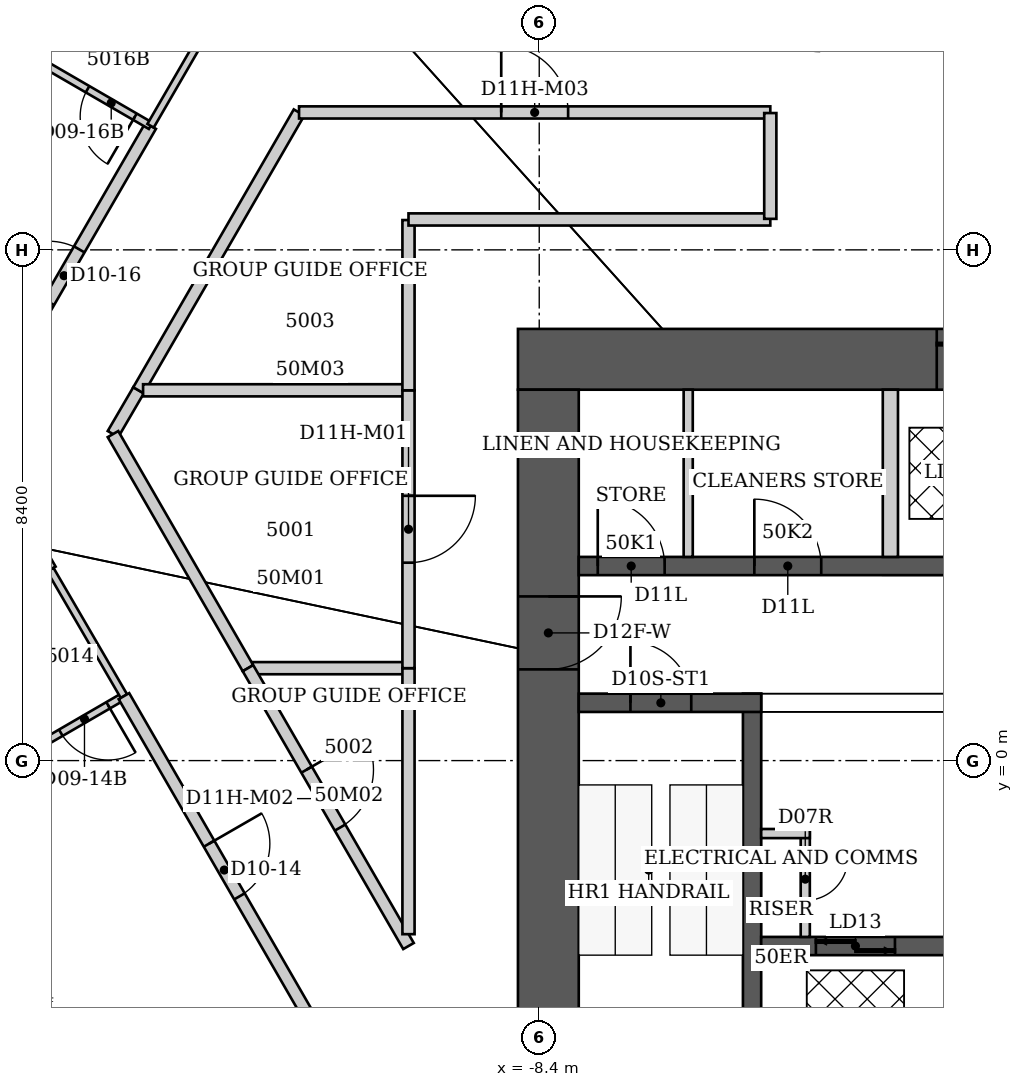
"""IFC4 building model, lengths in metres.
Left out: names, types, materials, properties, quantities, classifications, styles, units other than length and angle.
Written with IfcOpenShell. Run it as: python <this file> out.ifc"""

import sys

from ifc_helpers import new_model, si_unit, direction, frame, frame_2d, origin, place, context, subcontext, project, spatial, rectangle, extrude, element, fill, save


model = new_model("IFC4")
c1 = context("Model", 3, precision=1e-05, world=origin(), true_north=direction((0.0, 1.0)))
c2 = subcontext(c1, "Body", "Model", "MODEL_VIEW")
j1 = project(units=[si_unit("LENGTHUNIT", "METRE"), si_unit("PLANEANGLEUNIT", "RADIAN")], contexts=[c1])
p1 = place(None, origin())
s1 = spatial("IfcSite", under=j1, at=p1, CompositionType="ELEMENT")
p2 = place(p1, origin())
s2 = spatial("IfcBuilding", under=s1, at=p2, CompositionType="ELEMENT")
p3 = place(p2, frame((0.0, 0.0, 202.2)))
s3 = spatial("IfcBuildingStorey", under=s2, at=p3, CompositionType="ELEMENT", Elevation=202.2)
p4 = place(p3, frame((-8.75, 6.6, 0.0), z_axis=(0.0, 0.0, 1.0), x_axis=(1.0, 0.0, 0.0)))
e1 = element("IfcWall", 1, at=p4, inside=s3, PredefinedType="SHEAR", context=c2, shape_type="SweptSolid", body=[
    extrude(rectangle(XDim=17.5, YDim=1.0, at=frame_2d((8.75, 0.0))), origin(), (0.0, 0.0, 1.0), 3.8),
])
p5 = place(p4, frame((6.887, 0.0, 0.0)))
e2 = element("IfcOpeningElement", 2, at=p5, cuts=e1, PredefinedType="OPENING", context=c2, shape_type="SweptSolid", body=[
    extrude(rectangle(XDim=1.1, YDim=2.1, at=frame_2d((0.55, 1.05))), frame((0.0, 0.5, 0.0), z_axis=(0.0, -1.0, 0.0), x_axis=(1.0, 0.0, 0.0)), (0.0, 0.0, 1.0), 1.0),
])
p6 = place(p4, frame((9.512, 0.0, 0.0)))
e3 = element("IfcOpeningElement", 3, at=p6, cuts=e1, PredefinedType="OPENING", context=c2, shape_type="SweptSolid", body=[
    extrude(rectangle(XDim=1.1, YDim=2.1, at=frame_2d((0.55, 1.05))), frame((0.0, 0.5, 0.0), z_axis=(0.0, -1.0, 0.0), x_axis=(1.0, 0.0, 0.0)), (0.0, 0.0, 1.0), 1.0),
])
p7 = place(p4, frame((12.137, 0.0, 0.0)))
e4 = element("IfcOpeningElement", 4, at=p7, cuts=e1, PredefinedType="OPENING", context=c2, shape_type="SweptSolid", body=[
    extrude(rectangle(XDim=1.1, YDim=2.1, at=frame_2d((0.55, 1.05))), frame((0.0, 0.5, 0.0), z_axis=(0.0, -1.0, 0.0), x_axis=(1.0, 0.0, 0.0)), (0.0, 0.0, 1.0), 1.0),
])
p8 = place(p4, frame((14.762, 0.0, 0.0)))
e5 = element("IfcOpeningElement", 5, at=p8, cuts=e1, PredefinedType="OPENING", context=c2, shape_type="SweptSolid", body=[
    extrude(rectangle(XDim=1.1, YDim=2.1, at=frame_2d((0.55, 1.05))), frame((0.0, 0.5, 0.0), z_axis=(0.0, -1.0, 0.0), x_axis=(1.0, 0.0, 0.0)), (0.0, 0.0, 1.0), 1.0),
])
p9 = place(p3, frame((-8.25, -6.1, 0.0), z_axis=(0.0, 0.0, 1.0), x_axis=(0.0, 1.0, 0.0)))
e6 = element("IfcWall", 6, at=p9, inside=s3, PredefinedType="SHEAR", context=c2, shape_type="SweptSolid", body=[
    extrude(rectangle(XDim=12.2, YDim=1.0, at=frame_2d((6.1, 0.0))), origin(), (0.0, 0.0, 1.0), 3.8),
])
p10 = place(p9, frame((7.6, 0.0, 0.0)))
e7 = element("IfcOpeningElement", 7, at=p10, cuts=e6, PredefinedType="OPENING", context=c2, shape_type="SweptSolid", body=[
    extrude(rectangle(XDim=1.2, YDim=2.2, at=frame_2d((0.6, 1.1))), frame((0.0, 0.5, 0.0), z_axis=(0.0, -1.0, 0.0), x_axis=(1.0, 0.0, 0.0)), (0.0, 0.0, 1.0), 1.0),
])
p11 = place(p3, frame((-4.9, -6.1, 0.0), z_axis=(0.0, 0.0, 1.0), x_axis=(0.0, 1.0, 0.0)))
e8 = element("IfcWall", 8, at=p11, inside=s3, PredefinedType="SHEAR", context=c2, shape_type="SweptSolid", body=[
    extrude(rectangle(XDim=7.2, YDim=0.3, at=frame_2d((3.6, 0.0))), origin(), (0.0, 0.0, 1.0), 3.8),
])
p12 = place(p3, frame((-7.75, 0.95, 0.0), z_axis=(0.0, 0.0, 1.0), x_axis=(1.0, 0.0, 0.0)))
e9 = element("IfcWall", 9, at=p12, inside=s3, PredefinedType="SHEAR", context=c2, shape_type="SweptSolid", body=[
    extrude(rectangle(XDim=3.0, YDim=0.3, at=frame_2d((1.5, 0.0))), origin(), (0.0, 0.0, 1.0), 3.8),
])
p13 = place(p12, frame((0.85, 0.0, 0.0)))
e10 = element("IfcOpeningElement", 10, at=p13, cuts=e9, PredefinedType="OPENING", context=c2, shape_type="SweptSolid", body=[
    extrude(rectangle(XDim=1.0, YDim=2.2, at=frame_2d((0.5, 1.1))), frame((0.0, 0.15, 0.0), z_axis=(0.0, -1.0, 0.0), x_axis=(1.0, 0.0, 0.0)), (0.0, 0.0, 1.0), 0.3),
])
p14 = place(p3, frame((-4.75, -3.05, 0.0), z_axis=(0.0, 0.0, 1.0), x_axis=(1.0, 0.0, 0.0)))
e11 = element("IfcWall", 11, at=p14, inside=s3, PredefinedType="SHEAR", context=c2, shape_type="SweptSolid", body=[
    extrude(rectangle(XDim=3.1, YDim=0.3, at=frame_2d((1.55, 0.0))), origin(), (0.0, 0.0, 1.0), 3.8),
])
p15 = place(p14, frame((0.9, 0.0, 0.0)))
e12 = element("IfcOpeningElement", 12, at=p15, cuts=e11, PredefinedType="OPENING", context=c2, shape_type="SweptSolid", body=[
    extrude(rectangle(XDim=1.3, YDim=2.1, at=frame_2d((0.65, 1.05))), frame((0.0, 0.15, 0.0), z_axis=(0.0, -1.0, 0.0), x_axis=(1.0, 0.0, 0.0)), (0.0, 0.0, 1.0), 0.3),
])
p16 = place(p3, frame((-7.75, 3.2, 0.0), z_axis=(0.0, 0.0, 1.0), x_axis=(1.0, 0.0, 0.0)))
e13 = element("IfcWall", 13, at=p16, inside=s3, PredefinedType="SHEAR", context=c2, shape_type="SweptSolid", body=[
    extrude(rectangle(XDim=15.5, YDim=0.3, at=frame_2d((7.75, 0.0))), origin(), (0.0, 0.0, 1.0), 3.8),
])
p17 = place(p16, frame((0.312, 0.0, 0.0)))
e14 = element("IfcOpeningElement", 14, at=p17, cuts=e13, PredefinedType="OPENING", context=c2, shape_type="SweptSolid", body=[
    extrude(rectangle(XDim=1.1, YDim=2.2, at=frame_2d((0.55, 1.1))), frame((0.0, 0.15, 0.0), z_axis=(0.0, -1.0, 0.0), x_axis=(1.0, 0.0, 0.0)), (0.0, 0.0, 1.0), 0.3),
])
p18 = place(p16, frame((2.887, 0.0, 0.0)))
e15 = element("IfcOpeningElement", 15, at=p18, cuts=e13, PredefinedType="OPENING", context=c2, shape_type="SweptSolid", body=[
    extrude(rectangle(XDim=1.1, YDim=2.2, at=frame_2d((0.55, 1.1))), frame((0.0, 0.15, 0.0), z_axis=(0.0, -1.0, 0.0), x_axis=(1.0, 0.0, 0.0)), (0.0, 0.0, 1.0), 0.3),
])
p19 = place(p3, frame((-2.625, 3.35, 0.0), z_axis=(0.0, 0.0, 1.0), x_axis=(0.0, 1.0, 0.0)))
e16 = element("IfcWall", 16, at=p19, inside=s3, PredefinedType="PARTITIONING", context=c2, shape_type="SweptSolid", body=[
    extrude(rectangle(XDim=2.75, YDim=0.25, at=frame_2d((1.375, 0.0))), origin(), (0.0, 0.0, 1.0), 3.8),
])
p20 = place(p3, frame((-17.64, 5.51, 0.0), z_axis=(0.0, 0.0, 1.0), x_axis=(0.500468304441, 0.865754859212, 0.0)))
e17 = element("IfcWall", 17, at=p20, inside=s3, PredefinedType="PARTITIONING", context=c2, shape_type="SweptSolid", body=[
    extrude(rectangle(XDim=5.694, YDim=0.2, at=frame_2d((2.847, 0.0))), origin(), (0.0, 0.0, 1.0), 3.64),
])
p21 = place(p20, frame((2.347, 0.0, 0.0)))
e18 = element("IfcOpeningElement", 18, at=p21, cuts=e17, PredefinedType="OPENING", context=c2, shape_type="SweptSolid", body=[
    extrude(rectangle(XDim=1.0, YDim=2.13, at=frame_2d((0.5, 1.065))), frame((0.0, 0.1, 0.0), z_axis=(0.0, -1.0, 0.0), x_axis=(1.0, 0.0, 0.0)), (0.0, 0.0, 1.0), 0.2),
])
p22 = place(p3, frame((-17.54, -0.28, 0.0), z_axis=(0.0, 0.0, 1.0), x_axis=(0.86498992408, 0.501789229896, 0.0)))
e19 = element("IfcWall", 19, at=p22, inside=s3, PredefinedType="PARTITIONING", context=c2, shape_type="SweptSolid", body=[
    extrude(rectangle(XDim=2.671, YDim=0.12, at=frame_2d((1.335, 0.0))), origin(), (0.0, 0.0, 1.0), 3.64),
])
p23 = place(p22, frame((1.47, 0.0, 0.0)))
e20 = element("IfcOpeningElement", 20, at=p23, cuts=e19, PredefinedType="OPENING", context=c2, shape_type="SweptSolid", body=[
    extrude(rectangle(XDim=0.9, YDim=2.03, at=frame_2d((0.45, 1.015))), frame((0.0, 0.06, 0.0), z_axis=(0.0, -1.0, 0.0), x_axis=(1.0, 0.0, 0.0)), (0.0, 0.0, 1.0), 0.12),
])
p24 = place(p3, frame((-17.05, 11.75, 0.0), z_axis=(0.0, 0.0, 1.0), x_axis=(0.865155281359, -0.50150407689, 0.0)))
e21 = element("IfcWall", 21, at=p24, inside=s3, PredefinedType="PARTITIONING", context=c2, shape_type="SweptSolid", body=[
    extrude(rectangle(XDim=2.612, YDim=0.12, at=frame_2d((1.306, 0.0))), origin(), (0.0, 0.0, 1.0), 3.64),
])
p25 = place(p24, frame((1.412, 0.0, 0.0)))
e22 = element("IfcOpeningElement", 22, at=p25, cuts=e21, PredefinedType="OPENING", context=c2, shape_type="SweptSolid", body=[
    extrude(rectangle(XDim=0.9, YDim=2.03, at=frame_2d((0.45, 1.015))), frame((0.0, 0.06, 0.0), z_axis=(0.0, -1.0, 0.0), x_axis=(1.0, 0.0, 0.0)), (0.0, 0.0, 1.0), 0.12),
])
p26 = place(p3, frame((-16.44, 3.14, 0.0), z_axis=(0.0, 0.0, 1.0), x_axis=(-0.497825198029, 0.867277390578, 0.0)))
e23 = element("IfcWall", 23, at=p26, inside=s3, PredefinedType="PARTITIONING", context=c2, shape_type="SweptSolid", body=[
    extrude(rectangle(XDim=2.571, YDim=0.2, at=frame_2d((1.286, 0.0))), origin(), (0.0, 0.0, 1.0), 3.64),
])
p27 = place(p26, frame((1.1, 0.0, 0.0)))
e24 = element("IfcOpeningElement", 24, at=p27, cuts=e23, PredefinedType="OPENING", context=c2, shape_type="SweptSolid", body=[
    extrude(rectangle(XDim=1.0, YDim=2.13, at=frame_2d((0.5, 1.065))), frame((0.0, 0.1, 0.0), z_axis=(0.0, -1.0, 0.0), x_axis=(1.0, 0.0, 0.0)), (0.0, 0.0, 1.0), 0.2),
])
p28 = place(p3, frame((-16.44, 3.14, 0.0), z_axis=(0.0, 0.0, 1.0), x_axis=(0.502854986947, -0.864370789709, 0.0)))
e25 = element("IfcWall", 25, at=p28, inside=s3, PredefinedType="PARTITIONING", context=c2, shape_type="SweptSolid", body=[
    extrude(rectangle(XDim=2.406, YDim=0.12, at=frame_2d((1.203, 0.0))), origin(), (0.0, 0.0, 1.0), 3.64),
])
p29 = place(p3, frame((-15.41, 5.37, 0.0), z_axis=(0.0, 0.0, 1.0), x_axis=(0.503943891868, 0.863736391412, 0.0)))
e26 = element("IfcWall", 26, at=p29, inside=s3, PredefinedType="PARTITIONING", context=c2, shape_type="SweptSolid", body=[
    extrude(rectangle(XDim=0.833, YDim=0.2, at=frame_2d((0.417, 0.0))), origin(), (0.0, 0.0, 1.0), 3.64),
])
p30 = place(p3, frame((-15.23, 1.06, 0.0), z_axis=(0.0, 0.0, 1.0), x_axis=(0.499729921425, -0.866181277581, 0.0)))
e27 = element("IfcWall", 27, at=p30, inside=s3, PredefinedType="PARTITIONING", context=c2, shape_type="SweptSolid", body=[
    extrude(rectangle(XDim=6.604, YDim=0.2, at=frame_2d((3.302, 0.0))), origin(), (0.0, 0.0, 1.0), 3.64),
])
p31 = place(p30, frame((2.802, 0.0, 0.0)))
e28 = element("IfcOpeningElement", 28, at=p31, cuts=e27, PredefinedType="OPENING", context=c2, shape_type="SweptSolid", body=[
    extrude(rectangle(XDim=1.0, YDim=2.13, at=frame_2d((0.5, 1.065))), frame((0.0, 0.1, 0.0), z_axis=(0.0, -1.0, 0.0), x_axis=(1.0, 0.0, 0.0)), (0.0, 0.0, 1.0), 0.2),
])
p32 = place(p3, frame((-14.99, 6.09, 0.0), z_axis=(0.0, 0.0, 1.0), x_axis=(0.500213626659, 0.86590203124, 0.0)))
e29 = element("IfcWall", 29, at=p32, inside=s3, PredefinedType="PARTITIONING", context=c2, shape_type="SweptSolid", body=[
    extrude(rectangle(XDim=5.278, YDim=0.2, at=frame_2d((2.639, 0.0))), origin(), (0.0, 0.0, 1.0), 3.64),
])
p33 = place(p3, frame((-14.915, 6.09, 0.0), z_axis=(0.0, 0.0, 1.0), x_axis=(1.0, 0.0, 0.0)))
e30 = element("IfcWall", 30, at=p33, inside=s3, PredefinedType="PARTITIONING", context=c2, shape_type="SweptSolid", body=[
    extrude(rectangle(XDim=4.355, YDim=0.2, at=frame_2d((2.177, 0.0))), origin(), (0.0, 0.0, 1.0), 3.64),
])
p34 = place(p3, frame((-14.792, 10.441, 0.0), z_axis=(0.0, 0.0, 1.0), x_axis=(0.501340276177, 0.865250210912, 0.0)))
e31 = element("IfcWall", 31, at=p34, inside=s3, PredefinedType="PARTITIONING", context=c2, shape_type="SweptSolid", body=[
    extrude(rectangle(XDim=2.437, YDim=0.12, at=frame_2d((1.219, 0.0))), origin(), (0.0, 0.0, 1.0), 3.64),
])
p35 = place(p3, frame((-13.19, 1.52, 0.0), z_axis=(0.0, 0.0, 1.0), x_axis=(-0.499513190454, 0.866306281036, 0.0)))
e32 = element("IfcWall", 32, at=p35, inside=s3, PredefinedType="PARTITIONING", context=c2, shape_type="SweptSolid", body=[
    extrude(rectangle(XDim=4.444, YDim=0.2, at=frame_2d((2.222, 0.0))), origin(), (0.0, 0.0, 1.0), 3.64),
])
p36 = place(p3, frame((-12.35, 10.66, 0.0), z_axis=(0.0, 0.0, 1.0), x_axis=(1.0, 0.0, 0.0)))
e33 = element("IfcWall", 33, at=p36, inside=s3, PredefinedType="PARTITIONING", context=c2, shape_type="SweptSolid", body=[
    extrude(rectangle(XDim=7.75, YDim=0.2, at=frame_2d((3.875, 0.0))), origin(), (0.0, 0.0, 1.0), 3.64),
])
p37 = place(p36, frame((3.325, 0.0, 0.0)))
e34 = element("IfcOpeningElement", 34, at=p37, cuts=e33, PredefinedType="OPENING", context=c2, shape_type="SweptSolid", body=[
    extrude(rectangle(XDim=1.1, YDim=2.2, at=frame_2d((0.55, 1.1))), frame((0.0, 0.1, 0.0), z_axis=(0.0, -1.0, 0.0), x_axis=(1.0, 0.0, 0.0)), (0.0, 0.0, 1.0), 0.2),
])
p38 = place(p3, frame((-10.56, 1.52, 0.0), z_axis=(0.0, 0.0, 1.0), x_axis=(-1.0, 0.0, 0.0)))
e35 = element("IfcWall", 35, at=p38, inside=s3, PredefinedType="PARTITIONING", context=c2, shape_type="SweptSolid", body=[
    extrude(rectangle(XDim=2.56, YDim=0.2, at=frame_2d((1.28, 0.0))), origin(), (0.0, 0.0, 1.0), 3.64),
])
p39 = place(p3, frame((-10.55, -3.05, 0.0), z_axis=(0.0, 0.0, 1.0), x_axis=(-0.500193590286, 0.865913605527, 0.0)))
e36 = element("IfcWall", 36, at=p39, inside=s3, PredefinedType="PARTITIONING", context=c2, shape_type="SweptSolid", body=[
    extrude(rectangle(XDim=5.278, YDim=0.2, at=frame_2d((2.639, 0.0))), origin(), (0.0, 0.0, 1.0), 3.64),
])
p40 = place(p39, frame((2.25, 0.0, 0.0)))
e37 = element("IfcOpeningElement", 37, at=p40, cuts=e36, PredefinedType="OPENING", context=c2, shape_type="SweptSolid", body=[
    extrude(rectangle(XDim=1.1, YDim=2.2, at=frame_2d((0.55, 1.1))), frame((0.0, 0.1, 0.0), z_axis=(0.0, -1.0, 0.0), x_axis=(1.0, 0.0, 0.0)), (0.0, 0.0, 1.0), 0.2),
])
p41 = place(p3, frame((-10.55, 1.52, 0.0), z_axis=(0.0, 0.0, 1.0), x_axis=(0.0, -1.0, 0.0)))
e38 = element("IfcWall", 38, at=p41, inside=s3, PredefinedType="PARTITIONING", context=c2, shape_type="SweptSolid", body=[
    extrude(rectangle(XDim=4.375, YDim=0.2, at=frame_2d((2.188, 0.0))), origin(), (0.0, 0.0, 1.0), 3.64),
])
p42 = place(p3, frame((-10.55, 6.09, 0.0), z_axis=(0.0, 0.0, 1.0), x_axis=(0.0, -1.0, 0.0)))
e39 = element("IfcWall", 39, at=p42, inside=s3, PredefinedType="PARTITIONING", context=c2, shape_type="SweptSolid", body=[
    extrude(rectangle(XDim=4.57, YDim=0.2, at=frame_2d((2.285, 0.0))), origin(), (0.0, 0.0, 1.0), 3.64),
])
p43 = place(p42, frame((1.735, 0.0, 0.0)))
e40 = element("IfcOpeningElement", 40, at=p43, cuts=e39, PredefinedType="OPENING", context=c2, shape_type="SweptSolid", body=[
    extrude(rectangle(XDim=1.1, YDim=2.2, at=frame_2d((0.55, 1.1))), frame((0.0, 0.1, 0.0), z_axis=(0.0, -1.0, 0.0), x_axis=(1.0, 0.0, 0.0)), (0.0, 0.0, 1.0), 0.2),
])
p44 = place(p3, frame((-10.55, 8.89, 0.0), z_axis=(0.0, 0.0, 1.0), x_axis=(0.0, -1.0, 0.0)))
e41 = element("IfcWall", 41, at=p44, inside=s3, PredefinedType="PARTITIONING", context=c2, shape_type="SweptSolid", body=[
    extrude(rectangle(XDim=2.8, YDim=0.2, at=frame_2d((1.4, 0.0))), origin(), (0.0, 0.0, 1.0), 3.64),
])
p45 = place(p3, frame((-4.6, 8.9, 0.0), z_axis=(0.0, 0.0, 1.0), x_axis=(-1.0, 0.0, 0.0)))
e42 = element("IfcWall", 42, at=p45, inside=s3, PredefinedType="PARTITIONING", context=c2, shape_type="SweptSolid", body=[
    extrude(rectangle(XDim=5.95, YDim=0.2, at=frame_2d((2.975, 0.0))), origin(), (0.0, 0.0, 1.0), 3.64),
])
p46 = place(p3, frame((-4.6, 10.65, 0.0), z_axis=(0.0, 0.0, 1.0), x_axis=(0.0, -1.0, 0.0)))
e43 = element("IfcWall", 43, at=p46, inside=s3, PredefinedType="PARTITIONING", context=c2, shape_type="SweptSolid", body=[
    extrude(rectangle(XDim=1.74, YDim=0.2, at=frame_2d((0.87, 0.0))), origin(), (0.0, 0.0, 1.0), 3.64),
])
p47 = place(p3, frame((-4.025, -2.9, 0.0), z_axis=(0.0, 0.0, 1.0), x_axis=(0.0, 1.0, 0.0)))
e44 = element("IfcWall", 44, at=p47, inside=s3, PredefinedType="PARTITIONING", context=c2, shape_type="SweptSolid", body=[
    extrude(rectangle(XDim=1.775, YDim=0.15, at=frame_2d((0.887, 0.0))), origin(), (0.0, 0.0, 1.0), 3.64),
])
p48 = place(p47, frame((0.6, 0.0, 0.0)))
e45 = element("IfcOpeningElement", 45, at=p48, cuts=e44, PredefinedType="OPENING", context=c2, shape_type="SweptSolid", body=[
    extrude(rectangle(XDim=0.7, YDim=2.1, at=frame_2d((0.35, 1.05))), frame((0.0, 0.075, 0.0), z_axis=(0.0, -1.0, 0.0), x_axis=(1.0, 0.0, 0.0)), (0.0, 0.0, 1.0), 0.15),
])
p49 = place(p3, frame((-4.75, -1.2, 0.0), z_axis=(0.0, 0.0, 1.0), x_axis=(1.0, 0.0, 0.0)))
e46 = element("IfcWall", 46, at=p49, inside=s3, PredefinedType="PARTITIONING", context=c2, shape_type="SweptSolid", body=[
    extrude(rectangle(XDim=0.8, YDim=0.15, at=frame_2d((0.4, 0.0))), origin(), (0.0, 0.0, 1.0), 3.64),
])
p50 = place(p3, frame((-5.95, 3.35, 0.0), z_axis=(0.0, 0.0, 1.0), x_axis=(0.0, 1.0, 0.0)))
e47 = element("IfcWall", 47, at=p50, inside=s3, PredefinedType="PARTITIONING", context=c2, shape_type="SweptSolid", body=[
    extrude(rectangle(XDim=2.75, YDim=0.15, at=frame_2d((1.375, 0.0))), origin(), (0.0, 0.0, 1.0), 3.64),
])
p51 = place(p31, origin())
e48 = element("IfcDoor", 48, at=p51, inside=s3, OperationType="SINGLE_SWING_LEFT", PredefinedType="DOOR", context=c2, shape_type="SweptSolid", body=[
    extrude(rectangle(XDim=1.0, YDim=2.13, at=frame_2d((0.5, 1.065))), frame((0.0, 0.025, 0.0), z_axis=(0.0, -1.0, 0.0), x_axis=(1.0, 0.0, 0.0)), (0.0, 0.0, 1.0), 0.05),
])
fill(e28, e48)
p52 = place(p23, origin())
e49 = element("IfcDoor", 49, at=p52, inside=s3, OperationType="SINGLE_SWING_RIGHT", PredefinedType="DOOR", context=c2, shape_type="SweptSolid", body=[
    extrude(rectangle(XDim=0.9, YDim=2.03, at=frame_2d((0.45, 1.015))), frame((0.0, 0.025, 0.0), z_axis=(0.0, -1.0, 0.0), x_axis=(1.0, 0.0, 0.0)), (0.0, 0.0, 1.0), 0.05),
])
fill(e20, e49)
p53 = place(p21, origin())
e50 = element("IfcDoor", 50, at=p53, inside=s3, OperationType="SINGLE_SWING_LEFT", PredefinedType="DOOR", context=c2, shape_type="SweptSolid", body=[
    extrude(rectangle(XDim=1.0, YDim=2.13, at=frame_2d((0.5, 1.065))), frame((0.0, 0.025, 0.0), z_axis=(0.0, -1.0, 0.0), x_axis=(1.0, 0.0, 0.0)), (0.0, 0.0, 1.0), 0.05),
])
fill(e18, e50)
p54 = place(p25, origin())
e51 = element("IfcDoor", 51, at=p54, inside=s3, OperationType="SINGLE_SWING_RIGHT", PredefinedType="DOOR", context=c2, shape_type="SweptSolid", body=[
    extrude(rectangle(XDim=0.9, YDim=2.03, at=frame_2d((0.45, 1.015))), frame((0.0, 0.025, 0.0), z_axis=(0.0, -1.0, 0.0), x_axis=(1.0, 0.0, 0.0)), (0.0, 0.0, 1.0), 0.05),
])
fill(e22, e51)
p55 = place(p43, origin())
e52 = element("IfcDoor", 52, at=p55, inside=s3, OperationType="SINGLE_SWING_LEFT", PredefinedType="DOOR", context=c2, shape_type="SweptSolid", body=[
    extrude(rectangle(XDim=1.1, YDim=2.2, at=frame_2d((0.55, 1.1))), frame((0.0, 0.025, 0.0), z_axis=(0.0, -1.0, 0.0), x_axis=(1.0, 0.0, 0.0)), (0.0, 0.0, 1.0), 0.05),
])
fill(e40, e52)
p56 = place(p40, origin())
e53 = element("IfcDoor", 53, at=p56, inside=s3, OperationType="SINGLE_SWING_RIGHT", PredefinedType="DOOR", context=c2, shape_type="SweptSolid", body=[
    extrude(rectangle(XDim=1.1, YDim=2.2, at=frame_2d((0.55, 1.1))), frame((0.0, 0.025, 0.0), z_axis=(0.0, -1.0, 0.0), x_axis=(1.0, 0.0, 0.0)), (0.0, 0.0, 1.0), 0.05),
])
fill(e37, e53)
p57 = place(p37, origin())
e54 = element("IfcDoor", 54, at=p57, inside=s3, OperationType="SINGLE_SWING_LEFT", PredefinedType="DOOR", context=c2, shape_type="SweptSolid", body=[
    extrude(rectangle(XDim=1.1, YDim=2.2, at=frame_2d((0.55, 1.1))), frame((0.0, 0.025, 0.0), z_axis=(0.0, -1.0, 0.0), x_axis=(1.0, 0.0, 0.0)), (0.0, 0.0, 1.0), 0.05),
])
fill(e34, e54)
p58 = place(p13, origin())
e55 = element("IfcDoor", 55, at=p58, inside=s3, OperationType="SINGLE_SWING_LEFT", PredefinedType="DOOR", context=c2, shape_type="SweptSolid", body=[
    extrude(rectangle(XDim=1.0, YDim=2.2, at=frame_2d((0.5, 1.1))), frame((0.0, 0.025, 0.0), z_axis=(0.0, -1.0, 0.0), x_axis=(1.0, 0.0, 0.0)), (0.0, 0.0, 1.0), 0.05),
])
fill(e10, e55)
p59 = place(p10, origin())
e56 = element("IfcDoor", 56, at=p59, inside=s3, OperationType="SINGLE_SWING_RIGHT", PredefinedType="DOOR", context=c2, shape_type="SweptSolid", body=[
    extrude(rectangle(XDim=1.2, YDim=2.2, at=frame_2d((0.6, 1.1))), frame((0.0, 0.025, 0.0), z_axis=(0.0, -1.0, 0.0), x_axis=(1.0, 0.0, 0.0)), (0.0, 0.0, 1.0), 0.05),
])
fill(e7, e56)
p60 = place(p48, origin())
e57 = element("IfcDoor", 57, at=p60, inside=s3, OperationType="SINGLE_SWING_RIGHT", PredefinedType="DOOR", context=c2, shape_type="SweptSolid", body=[
    extrude(rectangle(XDim=0.7, YDim=2.1, at=frame_2d((0.35, 1.05))), frame((0.0, 0.025, 0.0), z_axis=(0.0, -1.0, 0.0), x_axis=(1.0, 0.0, 0.0)), (0.0, 0.0, 1.0), 0.05),
])
fill(e45, e57)
p61 = place(p17, origin())
e58 = element("IfcDoor", 58, at=p61, inside=s3, OperationType="SINGLE_SWING_LEFT", PredefinedType="DOOR", context=c2, shape_type="SweptSolid", body=[
    extrude(rectangle(XDim=1.1, YDim=2.2, at=frame_2d((0.55, 1.1))), frame((0.0, 0.025, 0.0), z_axis=(0.0, -1.0, 0.0), x_axis=(1.0, 0.0, 0.0)), (0.0, 0.0, 1.0), 0.05),
])
fill(e14, e58)
p62 = place(p18, origin())
e59 = element("IfcDoor", 59, at=p62, inside=s3, OperationType="SINGLE_SWING_LEFT", PredefinedType="DOOR", context=c2, shape_type="SweptSolid", body=[
    extrude(rectangle(XDim=1.1, YDim=2.2, at=frame_2d((0.55, 1.1))), frame((0.0, 0.025, 0.0), z_axis=(0.0, -1.0, 0.0), x_axis=(1.0, 0.0, 0.0)), (0.0, 0.0, 1.0), 0.05),
])
fill(e15, e59)
p63 = place(p5, origin())
e60 = element("IfcDoor", 60, at=p63, inside=s3, OperationType="DOUBLE_DOOR_SLIDING", PredefinedType="DOOR", context=c2, shape_type="SweptSolid", body=[
    extrude(rectangle(XDim=1.1, YDim=2.1, at=frame_2d((0.55, 1.05))), frame((0.0, 0.025, 0.0), z_axis=(0.0, -1.0, 0.0), x_axis=(1.0, 0.0, 0.0)), (0.0, 0.0, 1.0), 0.05),
])
fill(e2, e60)
p64 = place(p15, origin())
e61 = element("IfcDoor", 61, at=p64, inside=s3, OperationType="DOUBLE_DOOR_SLIDING", PredefinedType="DOOR", context=c2, shape_type="SweptSolid", body=[
    extrude(rectangle(XDim=1.3, YDim=2.1, at=frame_2d((0.65, 1.05))), frame((0.0, 0.025, 0.0), z_axis=(0.0, -1.0, 0.0), x_axis=(1.0, 0.0, 0.0)), (0.0, 0.0, 1.0), 0.05),
])
fill(e12, e61)
save(model, sys.argv[1])
